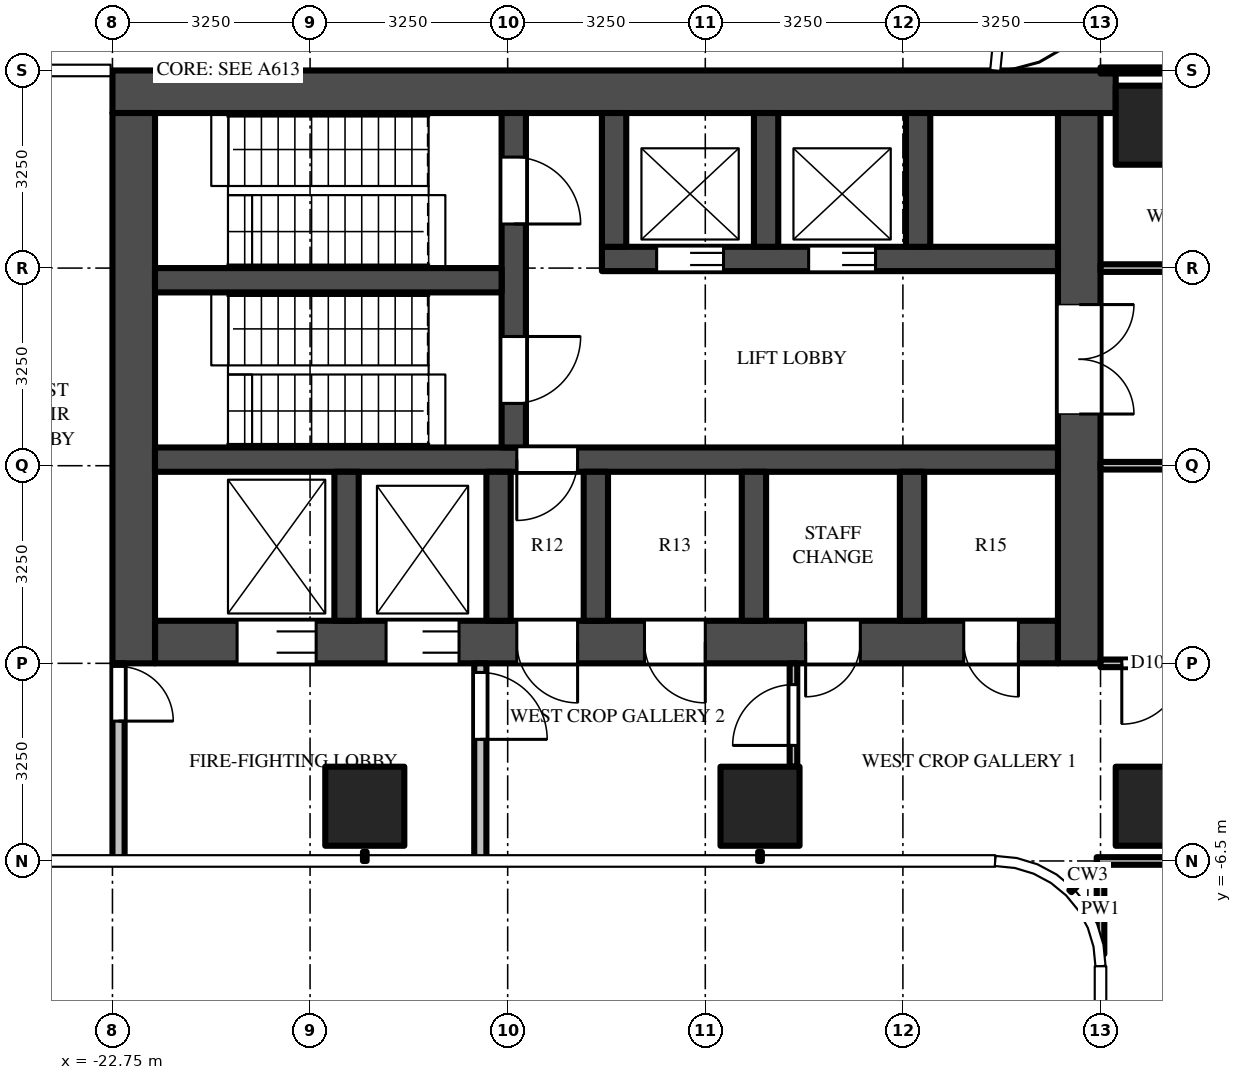
"""IFC4 building model, lengths in metres.
Left out: names, types, materials, properties, quantities, classifications, styles, units other than length and angle.
Written with IfcOpenShell. Run it as: python <this file> out.ifc"""

import sys

from ifc_helpers import new_model, si_unit, direction, frame, frame_2d, origin, origin_2d, place, context, subcontext, project, spatial, rectangle, extrude, source, transform, mapped, element, fill, save


model = new_model("IFC4")
c1 = context("Model", 3, precision=1e-05, world=origin(), true_north=direction((0.0, 1.0)))
c2 = subcontext(c1, "Body", "Model", "MODEL_VIEW")
j1 = project(units=[si_unit("LENGTHUNIT", "METRE"), si_unit("PLANEANGLEUNIT", "RADIAN")], contexts=[c1])
p1 = place(None, origin())
s1 = spatial("IfcSite", under=j1, at=p1, CompositionType="ELEMENT")
p2 = place(p1, origin())
s2 = spatial("IfcBuilding", under=s1, at=p2, CompositionType="ELEMENT")
p3 = place(p2, frame((0.0, 0.0, 97.5)))
s3 = spatial("IfcBuildingStorey", under=s2, at=p3, CompositionType="ELEMENT", Elevation=97.5)
m1 = source(origin(), c2, "Body", "SweptSolid", [
    extrude(rectangle(XDim=1.3, YDim=1.3, at=origin_2d()), origin(), (0.0, 0.0, 1.0), 4.5),
])
for number, where, z_axis, x_axis in (
    (1, (-5.6, 5.6, 0.0), (0.0, 0.0, 1.0), (1.0, 0.0, 0.0)),
    (2, (-5.6, -5.6, 0.0), (0.0, 0.0, 1.0), (1.0, 0.0, 0.0)),
    (3, (-12.1, -5.6, 0.0), (0.0, 0.0, 1.0), (1.0, 0.0, 0.0)),
    (4, (-18.6, -5.6, 0.0), (0.0, 0.0, 1.0), (1.0, 0.0, 0.0)),
):
    element("IfcColumn", number, at=place(p3, frame(where, z_axis=z_axis, x_axis=x_axis)), inside=s3, PredefinedType="COLUMN", context=c2, shape_type="MappedRepresentation", body=[
        mapped(m1, transform((0.0, 0.0, 0.0))),
    ])
m2 = source(origin(), c2, "Body", "SweptSolid", [
    extrude(rectangle(XDim=16.5, YDim=0.7, at=frame_2d((8.25, 0.0))), origin(), (0.0, 0.0, 1.0), 4.25),
])
p4 = place(p3, frame((-6.25, 6.15, 0.0), z_axis=(0.0, 0.0, 1.0), x_axis=(-1.0, 0.0, 0.0)))
e5 = element("IfcWall", 5, at=p4, inside=s3, PredefinedType="SHEAR", context=c2, shape_type="MappedRepresentation", body=[
    mapped(m2, transform((0.0, 0.0, 0.0))),
])
m3 = source(origin(), c2, "Body", "SweptSolid", [
    extrude(rectangle(XDim=14.85, YDim=0.7, at=frame_2d((7.425, 0.0))), origin(), (0.0, 0.0, 1.0), 4.25),
])
p5 = place(p3, frame((-7.2, -2.9, 0.0), z_axis=(0.0, 0.0, 1.0), x_axis=(-1.0, 0.0, 0.0)))
e6 = element("IfcWall", 6, at=p5, inside=s3, PredefinedType="SHEAR", context=c2, shape_type="MappedRepresentation", body=[
    mapped(m3, transform((0.0, 0.0, 0.0))),
])
m4 = source(origin(), c2, "Body", "SweptSolid", [
    extrude(rectangle(XDim=1.3, YDim=2.1, at=frame_2d((0.65, 1.05))), frame((0.0, 0.36, 0.0), z_axis=(0.0, -1.0, 0.0), x_axis=(1.0, 0.0, 0.0)), (0.0, 0.0, 1.0), 0.72),
])
p6 = place(p5, frame((12.2, 0.0, 0.0)))
e7 = element("IfcOpeningElement", 7, at=p6, cuts=e6, PredefinedType="OPENING", context=c2, shape_type="MappedRepresentation", body=[
    mapped(m4, transform((0.0, 0.0, 0.0))),
])
m5 = source(origin(), c2, "Body", "SweptSolid", [
    extrude(rectangle(XDim=1.2, YDim=2.1, at=frame_2d((0.6, 1.05))), frame((0.0, 0.36, 0.0), z_axis=(0.0, -1.0, 0.0), x_axis=(1.0, 0.0, 0.0)), (0.0, 0.0, 1.0), 0.72),
])
p7 = place(p5, frame((9.85, 0.0, 0.0)))
e8 = element("IfcOpeningElement", 8, at=p7, cuts=e6, PredefinedType="OPENING", context=c2, shape_type="MappedRepresentation", body=[
    mapped(m5, transform((0.0, 0.0, 0.0))),
])
m6 = source(origin(), c2, "Body", "SweptSolid", [
    extrude(rectangle(XDim=1.0, YDim=2.1, at=frame_2d((0.5, 1.05))), frame((0.0, 0.36, 0.0), z_axis=(0.0, -1.0, 0.0), x_axis=(1.0, 0.0, 0.0)), (0.0, 0.0, 1.0), 0.72),
])
p8 = place(p5, frame((7.9, 0.0, 0.0)))
e9 = element("IfcOpeningElement", 9, at=p8, cuts=e6, PredefinedType="OPENING", context=c2, shape_type="MappedRepresentation", body=[
    mapped(m6, transform((0.0, 0.0, 0.0))),
])
m7 = source(origin(), c2, "Body", "SweptSolid", [
    extrude(rectangle(XDim=0.9, YDim=2.1, at=frame_2d((0.45, 1.05))), frame((0.0, 0.36, 0.0), z_axis=(0.0, -1.0, 0.0), x_axis=(1.0, 0.0, 0.0)), (0.0, 0.0, 1.0), 0.72),
])
p9 = place(p5, frame((0.65, 0.0, 0.0)))
e10 = element("IfcOpeningElement", 10, at=p9, cuts=e6, PredefinedType="OPENING", context=c2, shape_type="MappedRepresentation", body=[
    mapped(m7, transform((0.0, 0.0, 0.0))),
])
p10 = place(p5, frame((3.25, 0.0, 0.0)))
e11 = element("IfcOpeningElement", 11, at=p10, cuts=e6, PredefinedType="OPENING", context=c2, shape_type="MappedRepresentation", body=[
    mapped(m7, transform((0.0, 0.0, 0.0))),
])
p11 = place(p5, frame((5.8, 0.0, 0.0)))
e12 = element("IfcOpeningElement", 12, at=p11, cuts=e6, PredefinedType="OPENING", context=c2, shape_type="MappedRepresentation", body=[
    mapped(m6, transform((0.0, 0.0, 0.0))),
])
m8 = source(origin(), c2, "Body", "SweptSolid", [
    extrude(rectangle(XDim=9.05, YDim=0.7, at=frame_2d((4.525, 0.0))), origin(), (0.0, 0.0, 1.0), 4.25),
])
p12 = place(p3, frame((-6.85, 5.8, 0.0), z_axis=(0.0, 0.0, 1.0), x_axis=(0.0, -1.0, 0.0)))
e13 = element("IfcWall", 13, at=p12, inside=s3, PredefinedType="SHEAR", context=c2, shape_type="MappedRepresentation", body=[
    mapped(m8, transform((0.0, 0.0, 0.0))),
])
m9 = source(origin(), c2, "Body", "SweptSolid", [
    extrude(rectangle(XDim=1.8, YDim=2.1, at=frame_2d((0.9, 1.05))), frame((0.0, 0.36, 0.0), z_axis=(0.0, -1.0, 0.0), x_axis=(1.0, 0.0, 0.0)), (0.0, 0.0, 1.0), 0.72),
])
p13 = place(p12, frame((3.15, 0.0, 0.0)))
e14 = element("IfcOpeningElement", 14, at=p13, cuts=e13, PredefinedType="OPENING", context=c2, shape_type="MappedRepresentation", body=[
    mapped(m9, transform((0.0, 0.0, 0.0))),
])
p14 = place(p3, frame((-22.4, 5.8, 0.0), z_axis=(0.0, 0.0, 1.0), x_axis=(0.0, -1.0, 0.0)))
e15 = element("IfcWall", 15, at=p14, inside=s3, PredefinedType="SHEAR", context=c2, shape_type="MappedRepresentation", body=[
    mapped(m8, transform((0.0, 0.0, 0.0))),
])
m10 = source(origin(), c2, "Body", "SweptSolid", [
    extrude(rectangle(XDim=7.5, YDim=0.4, at=frame_2d((3.75, 0.0))), origin(), (0.0, 0.0, 1.0), 4.25),
])
p15 = place(p3, frame((-7.2, 3.4, 0.0), z_axis=(0.0, 0.0, 1.0), x_axis=(-1.0, 0.0, 0.0)))
e16 = element("IfcWall", 16, at=p15, inside=s3, PredefinedType="SHEAR", context=c2, shape_type="MappedRepresentation", body=[
    mapped(m10, transform((0.0, 0.0, 0.0))),
])
m11 = source(origin(), c2, "Body", "SweptSolid", [
    extrude(rectangle(XDim=1.1, YDim=2.1, at=frame_2d((0.55, 1.05))), frame((0.0, 0.21, 0.0), z_axis=(0.0, -1.0, 0.0), x_axis=(1.0, 0.0, 0.0)), (0.0, 0.0, 1.0), 0.42),
])
p16 = place(p15, frame((3.0, 0.0, 0.0)))
e17 = element("IfcOpeningElement", 17, at=p16, cuts=e16, PredefinedType="OPENING", context=c2, shape_type="MappedRepresentation", body=[
    mapped(m11, transform((0.0, 0.0, 0.0))),
])
p17 = place(p15, frame((5.5, 0.0, 0.0)))
e18 = element("IfcOpeningElement", 18, at=p17, cuts=e16, PredefinedType="OPENING", context=c2, shape_type="MappedRepresentation", body=[
    mapped(m11, transform((0.0, 0.0, 0.0))),
])
m12 = source(origin(), c2, "Body", "SweptSolid", [
    extrude(rectangle(XDim=14.85, YDim=0.4, at=frame_2d((7.425, 0.0))), origin(), (0.0, 0.0, 1.0), 4.25),
])
p18 = place(p3, frame((-7.2, 0.1, 0.0), z_axis=(0.0, 0.0, 1.0), x_axis=(-1.0, 0.0, 0.0)))
e19 = element("IfcWall", 19, at=p18, inside=s3, PredefinedType="SHEAR", context=c2, shape_type="MappedRepresentation", body=[
    mapped(m12, transform((0.0, 0.0, 0.0))),
])
m13 = source(origin(), c2, "Body", "SweptSolid", [
    extrude(rectangle(XDim=1.0, YDim=2.1, at=frame_2d((0.5, 1.05))), frame((0.0, 0.21, 0.0), z_axis=(0.0, -1.0, 0.0), x_axis=(1.0, 0.0, 0.0)), (0.0, 0.0, 1.0), 0.42),
])
p19 = place(p18, frame((7.9, 0.0, 0.0)))
e20 = element("IfcOpeningElement", 20, at=p19, cuts=e19, PredefinedType="OPENING", context=c2, shape_type="MappedRepresentation", body=[
    mapped(m13, transform((0.0, 0.0, 0.0))),
])
m14 = source(origin(), c2, "Body", "SweptSolid", [
    extrude(rectangle(XDim=5.5, YDim=0.4, at=frame_2d((2.75, 0.0))), origin(), (0.0, 0.0, 1.0), 4.25),
])
p20 = place(p3, frame((-16.15, 5.8, 0.0), z_axis=(0.0, 0.0, 1.0), x_axis=(0.0, -1.0, 0.0)))
e21 = element("IfcWall", 21, at=p20, inside=s3, PredefinedType="SHEAR", context=c2, shape_type="MappedRepresentation", body=[
    mapped(m14, transform((0.0, 0.0, 0.0))),
])
p21 = place(p20, frame((0.725, 0.0, 0.0)))
e22 = element("IfcOpeningElement", 22, at=p21, cuts=e21, PredefinedType="OPENING", context=c2, shape_type="MappedRepresentation", body=[
    mapped(m11, transform((0.0, 0.0, 0.0))),
])
p22 = place(p20, frame((3.675, 0.0, 0.0)))
e23 = element("IfcOpeningElement", 23, at=p22, cuts=e21, PredefinedType="OPENING", context=c2, shape_type="MappedRepresentation", body=[
    mapped(m11, transform((0.0, 0.0, 0.0))),
])
m15 = source(origin(), c2, "Body", "SweptSolid", [
    extrude(rectangle(XDim=5.7, YDim=0.4, at=frame_2d((2.85, 0.0))), origin(), (0.0, 0.0, 1.0), 4.25),
])
p23 = place(p3, frame((-16.35, 3.05, 0.0), z_axis=(0.0, 0.0, 1.0), x_axis=(-1.0, 0.0, 0.0)))
e24 = element("IfcWall", 24, at=p23, inside=s3, PredefinedType="SHEAR", context=c2, shape_type="MappedRepresentation", body=[
    mapped(m15, transform((0.0, 0.0, 0.0))),
])
m16 = source(origin(), c2, "Body", "SweptSolid", [
    extrude(rectangle(XDim=2.2, YDim=0.4, at=frame_2d((1.1, 0.0))), origin(), (0.0, 0.0, 1.0), 4.25),
])
for number, where, z_axis, x_axis in (
    (25, (-9.5, 5.8, 0.0), (0.0, 0.0, 1.0), (0.0, -1.0, 0.0)),
    (26, (-12.0, 5.8, 0.0), (0.0, 0.0, 1.0), (0.0, -1.0, 0.0)),
    (27, (-14.5, 5.8, 0.0), (0.0, 0.0, 1.0), (0.0, -1.0, 0.0)),
):
    element("IfcWall", number, at=place(p3, frame(where, z_axis=z_axis, x_axis=x_axis)), inside=s3, PredefinedType="SHEAR", context=c2, shape_type="MappedRepresentation", body=[
        mapped(m16, transform((0.0, 0.0, 0.0))),
    ])
m17 = source(origin(), c2, "Body", "SweptSolid", [
    extrude(rectangle(XDim=2.45, YDim=0.4, at=frame_2d((1.225, 0.0))), origin(), (0.0, 0.0, 1.0), 4.25),
])
for number, where, z_axis, x_axis in (
    (28, (-9.6, -0.1, 0.0), (0.0, 0.0, 1.0), (0.0, -1.0, 0.0)),
    (29, (-12.2, -0.1, 0.0), (0.0, 0.0, 1.0), (0.0, -1.0, 0.0)),
    (30, (-14.8, -0.1, 0.0), (0.0, 0.0, 1.0), (0.0, -1.0, 0.0)),
    (31, (-16.4, -0.1, 0.0), (0.0, 0.0, 1.0), (0.0, -1.0, 0.0)),
    (32, (-18.9, -0.1, 0.0), (0.0, 0.0, 1.0), (0.0, -1.0, 0.0)),
):
    element("IfcWall", number, at=place(p3, frame(where, z_axis=z_axis, x_axis=x_axis)), inside=s3, PredefinedType="SHEAR", context=c2, shape_type="MappedRepresentation", body=[
        mapped(m17, transform((0.0, 0.0, 0.0))),
    ])
m18 = source(origin(), c2, "Body", "SweptSolid", [
    extrude(rectangle(XDim=3.25, YDim=0.2, at=frame_2d((1.625, 0.0))), origin(), (0.0, 0.0, 1.0), 4.25),
])
p24 = place(p3, frame((-16.7, -3.25, 0.0), z_axis=(0.0, 0.0, 1.0), x_axis=(0.0, -1.0, 0.0)))
e33 = element("IfcWall", 33, at=p24, inside=s3, PredefinedType="PARTITIONING", context=c2, shape_type="MappedRepresentation", body=[
    mapped(m18, transform((0.0, 0.0, 0.0))),
])
m19 = source(origin(), c2, "Body", "SweptSolid", [
    extrude(rectangle(XDim=1.1, YDim=2.1, at=frame_2d((0.55, 1.05))), frame((0.0, 0.11, 0.0), z_axis=(0.0, -1.0, 0.0), x_axis=(1.0, 0.0, 0.0)), (0.0, 0.0, 1.0), 0.22),
])
p25 = place(p24, frame((0.15, 0.0, 0.0)))
e34 = element("IfcOpeningElement", 34, at=p25, cuts=e33, PredefinedType="OPENING", context=c2, shape_type="MappedRepresentation", body=[
    mapped(m19, transform((0.0, 0.0, 0.0))),
])
p26 = place(p3, frame((-22.65, -3.25, 0.0), z_axis=(0.0, 0.0, 1.0), x_axis=(0.0, -1.0, 0.0)))
e35 = element("IfcWall", 35, at=p26, inside=s3, PredefinedType="PARTITIONING", context=c2, shape_type="MappedRepresentation", body=[
    mapped(m18, transform((0.0, 0.0, 0.0))),
])
m20 = source(origin(), c2, "Body", "SweptSolid", [
    extrude(rectangle(XDim=0.9, YDim=2.1, at=frame_2d((0.45, 1.05))), frame((0.0, 0.11, 0.0), z_axis=(0.0, -1.0, 0.0), x_axis=(1.0, 0.0, 0.0)), (0.0, 0.0, 1.0), 0.22),
])
p27 = place(p26, frame((0.05, 0.0, 0.0)))
e36 = element("IfcOpeningElement", 36, at=p27, cuts=e35, PredefinedType="OPENING", context=c2, shape_type="MappedRepresentation", body=[
    mapped(m20, transform((0.0, 0.0, 0.0))),
])
m21 = source(origin(), c2, "Body", "SweptSolid", [
    extrude(rectangle(XDim=1.7, YDim=0.125, at=frame_2d((0.85, 0.0))), origin(), (0.0, 0.0, 1.0), 4.25),
])
p28 = place(p3, frame((-11.55, -4.95, 0.0), z_axis=(0.0, 0.0, 1.0), x_axis=(0.0, 1.0, 0.0)))
e37 = element("IfcWall", 37, at=p28, inside=s3, PredefinedType="PARTITIONING", context=c2, shape_type="MappedRepresentation", body=[
    mapped(m21, transform((0.0, 0.0, 0.0))),
])
m22 = source(origin(), c2, "Body", "SweptSolid", [
    extrude(rectangle(XDim=1.0, YDim=2.1, at=frame_2d((0.5, 1.05))), frame((0.0, 0.073, 0.0), z_axis=(0.0, -1.0, 0.0), x_axis=(1.0, 0.0, 0.0)), (0.0, 0.0, 1.0), 0.145),
])
p29 = place(p28, frame((0.35, 0.0, 0.0)))
e38 = element("IfcOpeningElement", 38, at=p29, cuts=e37, PredefinedType="OPENING", context=c2, shape_type="MappedRepresentation", body=[
    mapped(m22, transform((0.0, 0.0, 0.0))),
])
m23 = source(origin(), c2, "Body", "SweptSolid", [
    extrude(rectangle(XDim=1.469, YDim=0.125, at=frame_2d((0.734, 0.0))), origin(), (0.0, 0.0, 1.0), 4.25),
])
p30 = place(p3, frame((-6.5, -6.562, 0.0), z_axis=(0.0, 0.0, 1.0), x_axis=(0.0, -1.0, 0.0)))
e39 = element("IfcWall", 39, at=p30, inside=s3, PredefinedType="PARTITIONING", context=c2, shape_type="MappedRepresentation", body=[
    mapped(m23, transform((0.0, 0.0, 0.0))),
])
m24 = source(origin(), c2, "Body", "SweptSolid", [
    extrude(rectangle(XDim=3.725, YDim=0.125, at=frame_2d((1.863, 0.0))), origin(), (0.0, 0.0, 1.0), 3.33),
])
p31 = place(p3, frame((-2.837, -6.5, 0.0), z_axis=(0.0, 0.0, 1.0), x_axis=(-1.0, 0.0, 0.0)))
e40 = element("IfcWall", 40, at=p31, inside=s3, PredefinedType="PARTITIONING", context=c2, shape_type="MappedRepresentation", body=[
    mapped(m24, transform((0.0, 0.0, 0.0))),
])
m25 = source(origin(), c2, "Body", "SweptSolid", [
    extrude(rectangle(XDim=5.363, YDim=0.125, at=frame_2d((2.681, 0.0))), origin(), (0.0, 0.0, 1.0), 3.468),
])
p32 = place(p3, frame((-1.137, -3.25, 0.0), z_axis=(0.0, 0.0, 1.0), x_axis=(-1.0, 0.0, 0.0)))
e41 = element("IfcWall", 41, at=p32, inside=s3, PredefinedType="PARTITIONING", context=c2, shape_type="MappedRepresentation", body=[
    mapped(m25, transform((0.0, 0.0, 0.0))),
])
p33 = place(p32, frame((4.012, 0.0, 0.0)))
e42 = element("IfcOpeningElement", 42, at=p33, cuts=e41, PredefinedType="OPENING", context=c2, shape_type="MappedRepresentation", body=[
    mapped(m22, transform((0.0, 0.0, 0.0))),
])
p34 = place(p3, frame((-1.137, 0.0, 0.0), z_axis=(0.0, 0.0, 1.0), x_axis=(-1.0, 0.0, 0.0)))
e43 = element("IfcWall", 43, at=p34, inside=s3, PredefinedType="PARTITIONING", context=c2, shape_type="MappedRepresentation", body=[
    mapped(m25, transform((0.0, 0.0, 0.0))),
])
p35 = place(p3, frame((-6.5, 3.25, 0.0), z_axis=(0.0, 0.0, 1.0), x_axis=(1.0, 0.0, 0.0)))
e44 = element("IfcWall", 44, at=p35, inside=s3, PredefinedType="PARTITIONING", context=c2, shape_type="MappedRepresentation", body=[
    mapped(m25, transform((0.0, 0.0, 0.0))),
])
p36 = place(p35, frame((3.95, 0.0, 0.0)))
e45 = element("IfcOpeningElement", 45, at=p36, cuts=e44, PredefinedType="OPENING", context=c2, shape_type="MappedRepresentation", body=[
    mapped(m22, transform((0.0, 0.0, 0.0))),
])
m26 = source(origin(), c2, "Body", "SweptSolid", [
    extrude(rectangle(XDim=5.363, YDim=0.1, at=frame_2d((2.681, 0.0))), origin(), (0.0, 0.0, 1.0), 3.33),
])
p37 = place(p3, frame((-6.5, 6.5, 0.0), z_axis=(0.0, 0.0, 1.0), x_axis=(1.0, 0.0, 0.0)))
e46 = element("IfcWall", 46, at=p37, inside=s3, PredefinedType="PARTITIONING", context=c2, shape_type="MappedRepresentation", body=[
    mapped(m26, transform((0.0, 0.0, 0.0))),
])
m27 = source(origin(), c2, "Body", "SweptSolid", [
    extrude(rectangle(XDim=1.1, YDim=2.1, at=frame_2d((0.55, 1.05))), frame((0.0, 0.025, 0.0), z_axis=(0.0, -1.0, 0.0), x_axis=(1.0, 0.0, 0.0)), (0.0, 0.0, 1.0), 0.05),
])
p38 = place(p16, origin())
e47 = element("IfcDoor", 47, at=p38, inside=s3, OperationType="DOUBLE_DOOR_SLIDING", PredefinedType="DOOR", context=c2, shape_type="MappedRepresentation", body=[
    mapped(m27, transform((0.0, 0.0, 0.0))),
])
fill(e17, e47)
p39 = place(p17, origin())
e48 = element("IfcDoor", 48, at=p39, inside=s3, OperationType="DOUBLE_DOOR_SLIDING", PredefinedType="DOOR", context=c2, shape_type="MappedRepresentation", body=[
    mapped(m27, transform((0.0, 0.0, 0.0))),
])
fill(e18, e48)
m28 = source(origin(), c2, "Body", "SweptSolid", [
    extrude(rectangle(XDim=1.3, YDim=2.1, at=frame_2d((0.65, 1.05))), frame((0.0, -0.275, 0.0), z_axis=(0.0, -1.0, 0.0), x_axis=(1.0, 0.0, 0.0)), (0.0, 0.0, 1.0), 0.05),
])
p40 = place(p6, origin())
e49 = element("IfcDoor", 49, at=p40, inside=s3, OperationType="DOUBLE_DOOR_SLIDING", PredefinedType="DOOR", context=c2, shape_type="MappedRepresentation", body=[
    mapped(m28, transform((0.0, 0.0, 0.0))),
])
fill(e7, e49)
m29 = source(origin(), c2, "Body", "SweptSolid", [
    extrude(rectangle(XDim=1.2, YDim=2.1, at=frame_2d((0.6, 1.05))), frame((0.0, -0.275, 0.0), z_axis=(0.0, -1.0, 0.0), x_axis=(1.0, 0.0, 0.0)), (0.0, 0.0, 1.0), 0.05),
])
p41 = place(p7, origin())
e50 = element("IfcDoor", 50, at=p41, inside=s3, OperationType="DOUBLE_DOOR_SLIDING", PredefinedType="DOOR", context=c2, shape_type="MappedRepresentation", body=[
    mapped(m29, transform((0.0, 0.0, 0.0))),
])
fill(e8, e50)
m30 = source(origin(), c2, "Body", "SweptSolid", [
    extrude(rectangle(XDim=1.8, YDim=2.1, at=frame_2d((0.9, 1.05))), frame((0.0, -0.275, 0.0), z_axis=(0.0, -1.0, 0.0), x_axis=(1.0, 0.0, 0.0)), (0.0, 0.0, 1.0), 0.05),
])
p42 = place(p13, origin())
e51 = element("IfcDoor", 51, at=p42, inside=s3, OperationType="DOUBLE_DOOR_SINGLE_SWING", PredefinedType="DOOR", context=c2, shape_type="MappedRepresentation", body=[
    mapped(m30, transform((0.0, 0.0, 0.0))),
])
fill(e14, e51)
p43 = place(p21, origin())
e52 = element("IfcDoor", 52, at=p43, inside=s3, OperationType="SINGLE_SWING_RIGHT", PredefinedType="DOOR", context=c2, shape_type="MappedRepresentation", body=[
    mapped(m27, transform((0.0, 0.0, 0.0))),
])
fill(e22, e52)
p44 = place(p22, origin())
e53 = element("IfcDoor", 53, at=p44, inside=s3, OperationType="SINGLE_SWING_LEFT", PredefinedType="DOOR", context=c2, shape_type="MappedRepresentation", body=[
    mapped(m27, transform((0.0, 0.0, 0.0))),
])
fill(e23, e53)
m31 = source(origin(), c2, "Body", "SweptSolid", [
    extrude(rectangle(XDim=1.0, YDim=2.1, at=frame_2d((0.5, 1.05))), frame((0.0, 0.025, 0.0), z_axis=(0.0, -1.0, 0.0), x_axis=(1.0, 0.0, 0.0)), (0.0, 0.0, 1.0), 0.05),
])
p45 = place(p19, origin())
e54 = element("IfcDoor", 54, at=p45, inside=s3, OperationType="SINGLE_SWING_RIGHT", PredefinedType="DOOR", context=c2, shape_type="MappedRepresentation", body=[
    mapped(m31, transform((0.0, 0.0, 0.0))),
])
fill(e20, e54)
m32 = source(origin(), c2, "Body", "SweptSolid", [
    extrude(rectangle(XDim=1.0, YDim=2.1, at=frame_2d((0.5, 1.05))), frame((0.0, -0.275, 0.0), z_axis=(0.0, -1.0, 0.0), x_axis=(1.0, 0.0, 0.0)), (0.0, 0.0, 1.0), 0.05),
])
p46 = place(p8, origin())
e55 = element("IfcDoor", 55, at=p46, inside=s3, OperationType="SINGLE_SWING_LEFT", PredefinedType="DOOR", context=c2, shape_type="MappedRepresentation", body=[
    mapped(m32, transform((0.0, 0.0, 0.0))),
])
fill(e9, e55)
p47 = place(p25, origin())
e56 = element("IfcDoor", 56, at=p47, inside=s3, OperationType="SINGLE_SWING_RIGHT", PredefinedType="DOOR", context=c2, shape_type="MappedRepresentation", body=[
    mapped(m27, transform((0.0, 0.0, 0.0))),
])
fill(e34, e56)
m33 = source(origin(), c2, "Body", "SweptSolid", [
    extrude(rectangle(XDim=0.9, YDim=2.1, at=frame_2d((0.45, 1.05))), frame((0.0, 0.025, 0.0), z_axis=(0.0, -1.0, 0.0), x_axis=(1.0, 0.0, 0.0)), (0.0, 0.0, 1.0), 0.05),
])
p48 = place(p27, origin())
e57 = element("IfcDoor", 57, at=p48, inside=s3, OperationType="SINGLE_SWING_RIGHT", PredefinedType="DOOR", context=c2, shape_type="MappedRepresentation", body=[
    mapped(m33, transform((0.0, 0.0, 0.0))),
])
fill(e36, e57)
m34 = source(origin(), c2, "Body", "SweptSolid", [
    extrude(rectangle(XDim=0.9, YDim=2.1, at=frame_2d((0.45, 1.05))), frame((0.0, -0.275, 0.0), z_axis=(0.0, -1.0, 0.0), x_axis=(1.0, 0.0, 0.0)), (0.0, 0.0, 1.0), 0.05),
])
p49 = place(p9, origin())
e58 = element("IfcDoor", 58, at=p49, inside=s3, OperationType="SINGLE_SWING_LEFT", PredefinedType="DOOR", context=c2, shape_type="MappedRepresentation", body=[
    mapped(m34, transform((0.0, 0.0, 0.0))),
])
fill(e10, e58)
p50 = place(p10, origin())
e59 = element("IfcDoor", 59, at=p50, inside=s3, OperationType="SINGLE_SWING_RIGHT", PredefinedType="DOOR", context=c2, shape_type="MappedRepresentation", body=[
    mapped(m34, transform((0.0, 0.0, 0.0))),
])
fill(e11, e59)
p51 = place(p11, origin())
e60 = element("IfcDoor", 60, at=p51, inside=s3, OperationType="SINGLE_SWING_LEFT", PredefinedType="DOOR", context=c2, shape_type="MappedRepresentation", body=[
    mapped(m32, transform((0.0, 0.0, 0.0))),
])
fill(e12, e60)
p52 = place(p29, origin())
e61 = element("IfcDoor", 61, at=p52, inside=s3, OperationType="SINGLE_SWING_LEFT", PredefinedType="DOOR", context=c2, shape_type="MappedRepresentation", body=[
    mapped(m31, transform((0.0, 0.0, 0.0))),
])
fill(e38, e61)
p53 = place(p33, origin())
e62 = element("IfcDoor", 62, at=p53, inside=s3, OperationType="SINGLE_SWING_RIGHT", PredefinedType="DOOR", context=c2, shape_type="MappedRepresentation", body=[
    mapped(m31, transform((0.0, 0.0, 0.0))),
])
fill(e42, e62)
save(model, sys.argv[1])
